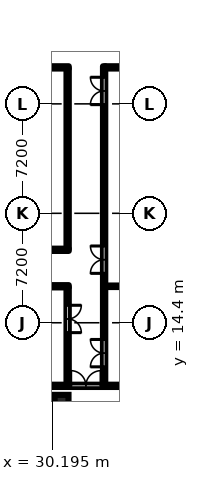
"""IFC4 building model, lengths in metres.
Left out: names, types, materials, properties, quantities, classifications, styles, units other than length and angle.
Written with IfcOpenShell. Run it as: python <this file> out.ifc"""

import sys

from ifc_helpers import new_model, si_unit, direction, frame, frame_2d, origin, origin_2d, place, context, subcontext, project, spatial, rectangle, hollow_circle, extrude, element, fill, save


model = new_model("IFC4")
c1 = context("Model", 3, precision=1e-05, world=origin(), true_north=direction((0.0, 1.0)))
c2 = subcontext(c1, "Body", "Model", "MODEL_VIEW")
j1 = project(units=[si_unit("LENGTHUNIT", "METRE"), si_unit("PLANEANGLEUNIT", "RADIAN")], contexts=[c1])
p1 = place(None, origin())
s1 = spatial("IfcSite", under=j1, at=p1, CompositionType="ELEMENT")
p2 = place(p1, origin())
s2 = spatial("IfcBuilding", under=s1, at=p2, CompositionType="ELEMENT")
p3 = place(p2, origin())
s3 = spatial("IfcBuildingStorey", under=s2, at=p3, CompositionType="ELEMENT", Elevation=0.0)
p4 = place(p3, frame((30.8, 9.2, 0.0), z_axis=(0.0, 0.0, 1.0), x_axis=(1.0, 0.0, 0.0)))
e1 = element("IfcColumn", 1, at=p4, inside=s3, PredefinedType="COLUMN", context=c2, shape_type="SweptSolid", body=[
    extrude(hollow_circle(Radius=0.457, WallThickness=0.05, at=origin_2d()), origin(), (0.0, 0.0, 1.0), 7.5),
])
p5 = place(p3, frame((12.675, 10.25, 0.0), z_axis=(0.0, 0.0, 1.0), x_axis=(1.0, 0.0, 0.0)))
e2 = element("IfcWall", 2, at=p5, inside=s3, PredefinedType="PARTITIONING", context=c2, shape_type="SweptSolid", body=[
    extrude(rectangle(XDim=37.545, YDim=0.15, at=frame_2d((18.772, 0.0))), origin(), (0.0, 0.0, 1.0), 6.6),
])
p6 = place(p5, frame((4.225, 0.0, 0.0)))
e3 = element("IfcOpeningElement", 3, at=p6, cuts=e2, PredefinedType="OPENING", context=c2, shape_type="SweptSolid", body=[
    extrude(rectangle(XDim=1.2, YDim=2.1, at=frame_2d((0.6, 1.05))), frame((0.0, 0.085, 0.0), z_axis=(0.0, -1.0, 0.0), x_axis=(1.0, 0.0, 0.0)), (0.0, 0.0, 1.0), 0.17),
])
p7 = place(p5, frame((18.725, 0.0, 0.0)))
e4 = element("IfcOpeningElement", 4, at=p7, cuts=e2, PredefinedType="OPENING", context=c2, shape_type="SweptSolid", body=[
    extrude(rectangle(XDim=2.0, YDim=2.1, at=frame_2d((1.0, 1.05))), frame((0.0, 0.085, 0.0), z_axis=(0.0, -1.0, 0.0), x_axis=(1.0, 0.0, 0.0)), (0.0, 0.0, 1.0), 0.17),
])
p8 = place(p3, frame((18.675, 16.8, 0.0), z_axis=(0.0, 0.0, 1.0), x_axis=(1.0, 0.0, 0.0)))
e5 = element("IfcWall", 5, at=p8, inside=s3, PredefinedType="PARTITIONING", context=c2, shape_type="SweptSolid", body=[
    extrude(rectangle(XDim=12.6, YDim=0.15, at=frame_2d((6.3, 0.0))), origin(), (0.0, 0.0, 1.0), 6.6),
])
p9 = place(p3, frame((18.675, 19.2, 0.0), z_axis=(0.0, 0.0, 1.0), x_axis=(1.0, 0.0, 0.0)))
e6 = element("IfcWall", 6, at=p9, inside=s3, PredefinedType="PARTITIONING", context=c2, shape_type="SweptSolid", body=[
    extrude(rectangle(XDim=12.6, YDim=0.15, at=frame_2d((6.3, 0.0))), origin(), (0.0, 0.0, 1.0), 6.6),
])
p10 = place(p9, frame((1.175, 0.0, 0.0)))
e7 = element("IfcOpeningElement", 7, at=p10, cuts=e6, PredefinedType="OPENING", context=c2, shape_type="SweptSolid", body=[
    extrude(rectangle(XDim=1.2, YDim=2.1, at=frame_2d((0.6, 1.05))), frame((0.0, 0.085, 0.0), z_axis=(0.0, -1.0, 0.0), x_axis=(1.0, 0.0, 0.0)), (0.0, 0.0, 1.0), 0.17),
])
p11 = place(p9, frame((9.78, 0.0, 0.0)))
e8 = element("IfcOpeningElement", 8, at=p11, cuts=e6, PredefinedType="OPENING", context=c2, shape_type="SweptSolid", body=[
    extrude(rectangle(XDim=1.2, YDim=2.1, at=frame_2d((0.6, 1.05))), frame((0.0, 0.085, 0.0), z_axis=(0.0, -1.0, 0.0), x_axis=(1.0, 0.0, 0.0)), (0.0, 0.0, 1.0), 0.17),
])
p12 = place(p3, frame((18.675, 31.2, 0.0), z_axis=(0.0, 0.0, 1.0), x_axis=(1.0, 0.0, 0.0)))
e9 = element("IfcWall", 9, at=p12, inside=s3, PredefinedType="PARTITIONING", context=c2, shape_type="SweptSolid", body=[
    extrude(rectangle(XDim=12.6, YDim=0.15, at=frame_2d((6.3, 0.0))), origin(), (0.0, 0.0, 1.0), 6.6),
])
p13 = place(p12, frame((3.68, 0.0, 0.0)))
e10 = element("IfcOpeningElement", 10, at=p13, cuts=e9, PredefinedType="OPENING", context=c2, shape_type="SweptSolid", body=[
    extrude(rectangle(XDim=1.2, YDim=2.1, at=frame_2d((0.6, 1.05))), frame((0.0, 0.085, 0.0), z_axis=(0.0, -1.0, 0.0), x_axis=(1.0, 0.0, 0.0)), (0.0, 0.0, 1.0), 0.17),
])
p14 = place(p12, frame((7.675, 0.0, 0.0)))
e11 = element("IfcOpeningElement", 11, at=p14, cuts=e9, PredefinedType="OPENING", context=c2, shape_type="SweptSolid", body=[
    extrude(rectangle(XDim=1.2, YDim=2.1, at=frame_2d((0.6, 1.05))), frame((0.0, 0.085, 0.0), z_axis=(0.0, -1.0, 0.0), x_axis=(1.0, 0.0, 0.0)), (0.0, 0.0, 1.0), 0.17),
])
p15 = place(p3, frame((31.2, 10.325, 0.0), z_axis=(0.0, 0.0, 1.0), x_axis=(0.0, 1.0, 0.0)))
e12 = element("IfcWall", 12, at=p15, inside=s3, PredefinedType="PARTITIONING", context=c2, shape_type="SweptSolid", body=[
    extrude(rectangle(XDim=6.4, YDim=0.15, at=frame_2d((3.2, 0.0))), origin(), (0.0, 0.0, 1.0), 6.6),
])
p16 = place(p15, frame((3.425, 0.0, 0.0)))
e13 = element("IfcOpeningElement", 13, at=p16, cuts=e12, PredefinedType="OPENING", context=c2, shape_type="SweptSolid", body=[
    extrude(rectangle(XDim=1.8, YDim=2.1, at=frame_2d((0.9, 1.05))), frame((0.0, 0.085, 0.0), z_axis=(0.0, -1.0, 0.0), x_axis=(1.0, 0.0, 0.0)), (0.0, 0.0, 1.0), 0.17),
])
p17 = place(p3, frame((31.2, 19.275, 0.0), z_axis=(0.0, 0.0, 1.0), x_axis=(0.0, 1.0, 0.0)))
e14 = element("IfcWall", 14, at=p17, inside=s3, PredefinedType="PARTITIONING", context=c2, shape_type="SweptSolid", body=[
    extrude(rectangle(XDim=11.85, YDim=0.15, at=frame_2d((5.925, 0.0))), origin(), (0.0, 0.0, 1.0), 6.6),
])
p18 = place(p3, frame((33.6, 10.325, 0.0), z_axis=(0.0, 0.0, 1.0), x_axis=(0.0, 1.0, 0.0)))
e15 = element("IfcWall", 15, at=p18, inside=s3, PredefinedType="PARTITIONING", context=c2, shape_type="SweptSolid", body=[
    extrude(rectangle(XDim=20.95, YDim=0.15, at=frame_2d((10.475, 0.0))), origin(), (0.0, 0.0, 1.0), 6.6),
])
p19 = place(p18, frame((1.175, 0.0, 0.0)))
e16 = element("IfcOpeningElement", 16, at=p19, cuts=e15, PredefinedType="OPENING", context=c2, shape_type="SweptSolid", body=[
    extrude(rectangle(XDim=1.8, YDim=2.1, at=frame_2d((0.9, 1.05))), frame((0.0, 0.085, 0.0), z_axis=(0.0, -1.0, 0.0), x_axis=(1.0, 0.0, 0.0)), (0.0, 0.0, 1.0), 0.17),
])
p20 = place(p18, frame((7.325, 0.0, 0.0)))
e17 = element("IfcOpeningElement", 17, at=p20, cuts=e15, PredefinedType="OPENING", context=c2, shape_type="SweptSolid", body=[
    extrude(rectangle(XDim=1.8, YDim=2.1, at=frame_2d((0.9, 1.05))), frame((0.0, 0.085, 0.0), z_axis=(0.0, -1.0, 0.0), x_axis=(1.0, 0.0, 0.0)), (0.0, 0.0, 1.0), 0.17),
])
p21 = place(p18, frame((18.425, 0.0, 0.0)))
e18 = element("IfcOpeningElement", 18, at=p21, cuts=e15, PredefinedType="OPENING", context=c2, shape_type="SweptSolid", body=[
    extrude(rectangle(XDim=1.8, YDim=2.1, at=frame_2d((0.9, 1.05))), frame((0.0, 0.085, 0.0), z_axis=(0.0, -1.0, 0.0), x_axis=(1.0, 0.0, 0.0)), (0.0, 0.0, 1.0), 0.17),
])
p22 = place(p3, frame((33.675, 16.8, 0.0), z_axis=(0.0, 0.0, 1.0), x_axis=(1.0, 0.0, 0.0)))
e19 = element("IfcWall", 19, at=p22, inside=s3, PredefinedType="PARTITIONING", context=c2, shape_type="SweptSolid", body=[
    extrude(rectangle(XDim=16.545, YDim=0.1, at=frame_2d((8.272, 0.0))), origin(), (0.0, 0.0, 1.0), 6.6),
])
p23 = place(p3, frame((33.675, 31.2, 0.0), z_axis=(0.0, 0.0, 1.0), x_axis=(1.0, 0.0, 0.0)))
e20 = element("IfcWall", 20, at=p23, inside=s3, PredefinedType="PARTITIONING", context=c2, shape_type="SweptSolid", body=[
    extrude(rectangle(XDim=16.545, YDim=0.15, at=frame_2d((8.272, 0.0))), origin(), (0.0, 0.0, 1.0), 6.6),
])
p24 = place(p23, frame((13.975, 0.0, 0.0)))
e21 = element("IfcOpeningElement", 21, at=p24, cuts=e20, PredefinedType="OPENING", context=c2, shape_type="SweptSolid", body=[
    extrude(rectangle(XDim=1.8, YDim=2.1, at=frame_2d((0.9, 1.05))), frame((0.0, 0.085, 0.0), z_axis=(0.0, -1.0, 0.0), x_axis=(1.0, 0.0, 0.0)), (0.0, 0.0, 1.0), 0.17),
])
p25 = place(p7, origin())
e22 = element("IfcDoor", 22, at=p25, inside=s3, OperationType="DOUBLE_DOOR_DOUBLE_SWING", PredefinedType="DOOR", context=c2, shape_type="SweptSolid", body=[
    extrude(rectangle(XDim=2.0, YDim=2.1, at=frame_2d((1.0, 1.05))), frame((0.0, 0.025, 0.0), z_axis=(0.0, -1.0, 0.0), x_axis=(1.0, 0.0, 0.0)), (0.0, 0.0, 1.0), 0.05),
])
fill(e4, e22)
p26 = place(p16, frame((1.8, 0.0, 0.0), z_axis=(0.0, 0.0, 1.0), x_axis=(-1.0, 0.0, 0.0)))
e23 = element("IfcDoor", 23, at=p26, inside=s3, OperationType="DOUBLE_DOOR_DOUBLE_SWING", PredefinedType="DOOR", context=c2, shape_type="SweptSolid", body=[
    extrude(rectangle(XDim=1.8, YDim=2.1, at=frame_2d((0.9, 1.05))), frame((0.0, 0.025, 0.0), z_axis=(0.0, -1.0, 0.0), x_axis=(1.0, 0.0, 0.0)), (0.0, 0.0, 1.0), 0.05),
])
fill(e13, e23)
p27 = place(p19, origin())
e24 = element("IfcDoor", 24, at=p27, inside=s3, OperationType="DOUBLE_DOOR_DOUBLE_SWING", PredefinedType="DOOR", context=c2, shape_type="SweptSolid", body=[
    extrude(rectangle(XDim=1.8, YDim=2.1, at=frame_2d((0.9, 1.05))), frame((0.0, 0.025, 0.0), z_axis=(0.0, -1.0, 0.0), x_axis=(1.0, 0.0, 0.0)), (0.0, 0.0, 1.0), 0.05),
])
fill(e16, e24)
p28 = place(p20, origin())
e25 = element("IfcDoor", 25, at=p28, inside=s3, OperationType="DOUBLE_DOOR_DOUBLE_SWING", PredefinedType="DOOR", context=c2, shape_type="SweptSolid", body=[
    extrude(rectangle(XDim=1.8, YDim=2.1, at=frame_2d((0.9, 1.05))), frame((0.0, 0.025, 0.0), z_axis=(0.0, -1.0, 0.0), x_axis=(1.0, 0.0, 0.0)), (0.0, 0.0, 1.0), 0.05),
])
fill(e17, e25)
p29 = place(p21, origin())
e26 = element("IfcDoor", 26, at=p29, inside=s3, OperationType="DOUBLE_DOOR_DOUBLE_SWING", PredefinedType="DOOR", context=c2, shape_type="SweptSolid", body=[
    extrude(rectangle(XDim=1.8, YDim=2.1, at=frame_2d((0.9, 1.05))), frame((0.0, 0.025, 0.0), z_axis=(0.0, -1.0, 0.0), x_axis=(1.0, 0.0, 0.0)), (0.0, 0.0, 1.0), 0.05),
])
fill(e18, e26)
save(model, sys.argv[1])
